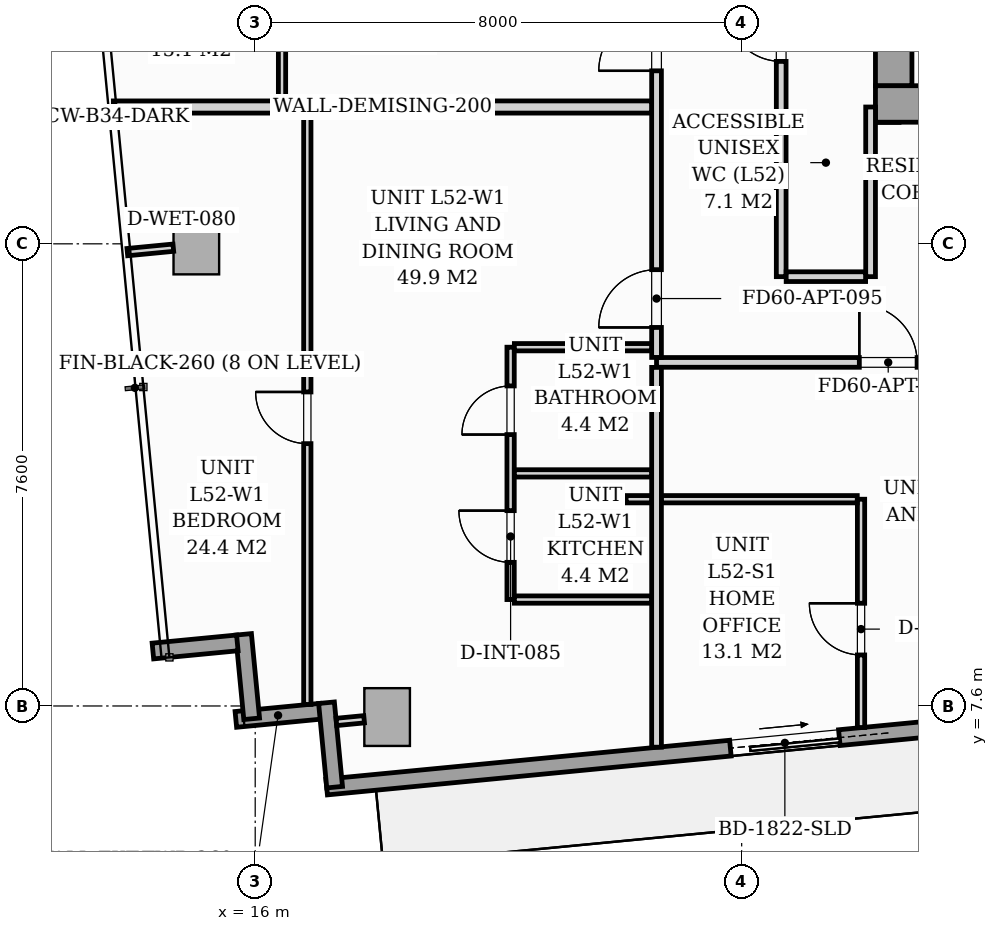
"""IFC4 building model, lengths in metres.
Left out: names, types, materials, properties, quantities, classifications, styles, units other than length and angle.
Written with IfcOpenShell. Run it as: python <this file> out.ifc"""

import sys

from ifc_helpers import new_model, si_unit, direction, frame, frame_2d, origin, origin_2d, place, context, subcontext, project, spatial, rectangle, i_section, extrude, source, transform, mapped, element, fill, save


model = new_model("IFC4")
c1 = context("Model", 3, precision=1e-05, world=origin(), true_north=direction((0.0, 1.0)))
c2 = subcontext(c1, "Body", "Model", "MODEL_VIEW")
j1 = project(units=[si_unit("LENGTHUNIT", "METRE"), si_unit("PLANEANGLEUNIT", "RADIAN")], contexts=[c1])
p1 = place(None, origin())
s1 = spatial("IfcSite", under=j1, at=p1, CompositionType="ELEMENT")
p2 = place(p1, origin())
s2 = spatial("IfcBuilding", under=s1, at=p2, CompositionType="ELEMENT")
p3 = place(p2, frame((0.0, 0.0, 182.6)))
s3 = spatial("IfcBuildingStorey", under=s2, at=p3, CompositionType="ELEMENT", Elevation=182.6)
m1 = source(origin(), c2, "Body", "SweptSolid", [
    extrude(i_section(OverallWidth=0.416, OverallDepth=0.446, WebThickness=0.039, FlangeThickness=0.063, FilletRadius=0.018, at=origin_2d()), origin(), (0.0, 0.0, 1.0), 3.196),
])
p4 = place(p3, frame((26.4, 17.4, 0.002), z_axis=(0.0, 0.0, 1.0), x_axis=(1.0, 0.0, 0.0)))
e1 = element("IfcColumn", 1, at=p4, inside=s3, PredefinedType="PILASTER", context=c2, shape_type="MappedRepresentation", body=[
    mapped(m1, transform((0.0, 0.0, 0.0), scale=1.0)),
])
m2 = source(origin(), c2, "Body", "SweptSolid", [
    extrude(rectangle(XDim=0.75, YDim=0.95, at=origin_2d()), origin(), (0.0, 0.0, 1.0), 3.196),
])
for number, where, z_axis, x_axis in (
    (2, (18.169, 7.418, 0.002), (0.0, 0.0, 1.0), (0.995, 0.096, 0.0)),
    (3, (15.032, 15.173, 0.002), (0.0, 0.0, 1.0), (0.995, 0.096, 0.0)),
):
    element("IfcColumn", number, at=place(p3, frame(where, z_axis=z_axis, x_axis=x_axis)), inside=s3, PredefinedType="COLUMN", context=c2, shape_type="MappedRepresentation", body=[
        mapped(m2, transform((0.0, 0.0, 0.0), scale=1.0)),
    ])
p5 = place(p3, frame((17.07, 7.513, 0.0), z_axis=(0.0, 0.0, 1.0), x_axis=(-0.995391056452, -0.09589913835, 0.0)))
e4 = element("IfcWall", 4, at=p5, inside=s3, PredefinedType="STANDARD", context=c2, shape_type="SweptSolid", body=[
    extrude(rectangle(XDim=1.395, YDim=0.26, at=frame_2d((0.698, 0.0))), origin(), (0.0, 0.0, 1.0), 2.94),
])
p6 = place(p3, frame((15.942, 7.389, 0.0), z_axis=(0.0, 0.0, 1.0), x_axis=(-0.095742423056, 0.99540614245, 0.0)))
e5 = element("IfcWall", 5, at=p6, inside=s3, PredefinedType="STANDARD", context=c2, shape_type="SweptSolid", body=[
    extrude(rectangle(XDim=1.395, YDim=0.26, at=frame_2d((0.697, 0.0))), origin(), (0.0, 0.0, 1.0), 2.94),
])
p7 = place(p3, frame((15.706, 8.637, 0.0), z_axis=(0.0, 0.0, 1.0), x_axis=(-0.995391056452, -0.09589913835, 0.0)))
e6 = element("IfcWall", 6, at=p7, inside=s3, PredefinedType="STANDARD", context=c2, shape_type="SweptSolid", body=[
    extrude(rectangle(XDim=1.395, YDim=0.26, at=frame_2d((0.698, 0.0))), origin(), (0.0, 0.0, 1.0), 2.94),
])
p8 = place(p3, frame((33.201, 7.81, 0.0), z_axis=(0.0, 0.0, 1.0), x_axis=(-0.995397074604, -0.095836652014, 0.0)))
e7 = element("IfcWall", 7, at=p8, inside=s3, PredefinedType="STANDARD", context=c2, shape_type="SweptSolid", body=[
    extrude(rectangle(XDim=16.1, YDim=0.26, at=frame_2d((8.05, 0.0))), origin(), (0.0, 0.0, 1.0), 2.94),
])
p9 = place(p8, frame((7.63, 0.0, 0.0)))
e8 = element("IfcOpeningElement", 8, at=p9, cuts=e7, PredefinedType="OPENING", context=c2, shape_type="SweptSolid", body=[
    extrude(rectangle(XDim=1.8, YDim=2.06, at=frame_2d((0.9, 1.03))), frame((0.0, 0.14, 0.0), z_axis=(0.0, -1.0, 0.0), x_axis=(1.0, 0.0, 0.0)), (0.0, 0.0, 1.0), 0.28),
])
p10 = place(p8, frame((0.7, 0.0, 0.65)))
e9 = element("IfcOpeningElement", 9, at=p10, cuts=e7, PredefinedType="OPENING", context=c2, shape_type="SweptSolid", body=[
    extrude(rectangle(XDim=1.6, YDim=1.5, at=frame_2d((0.8, 0.75))), frame((0.0, 0.14, 0.0), z_axis=(0.0, -1.0, 0.0), x_axis=(1.0, 0.0, 0.0)), (0.0, 0.0, 1.0), 0.28),
])
p11 = place(p3, frame((17.306, 6.265, 0.0), z_axis=(0.0, 0.0, 1.0), x_axis=(-0.095915846097, 0.995389446633, 0.0)))
e10 = element("IfcWall", 10, at=p11, inside=s3, PredefinedType="STANDARD", context=c2, shape_type="SweptSolid", body=[
    extrude(rectangle(XDim=1.395, YDim=0.26, at=frame_2d((0.697, 0.0))), origin(), (0.0, 0.0, 1.0), 2.94),
])
p12 = place(p3, frame((26.2, 17.5, 0.0), z_axis=(0.0, 0.0, 1.0), x_axis=(1.0, 0.0, 0.0)))
e11 = element("IfcWall", 11, at=p12, inside=s3, PredefinedType="SHEAR", context=c2, shape_type="SweptSolid", body=[
    extrude(rectangle(XDim=19.6, YDim=0.6, at=frame_2d((9.8, 0.0))), origin(), (0.0, 0.0, 1.0), 3.2),
])
p13 = place(p12, frame((0.95, 0.0, 0.0)))
e12 = element("IfcOpeningElement", 12, at=p13, cuts=e11, PredefinedType="OPENING", context=c2, shape_type="SweptSolid", body=[
    extrude(rectangle(XDim=0.95, YDim=2.06, at=frame_2d((0.475, 1.03))), frame((0.0, 0.31, 0.0), z_axis=(0.0, -1.0, 0.0), x_axis=(1.0, 0.0, 0.0)), (0.0, 0.0, 1.0), 0.62),
])
p14 = place(p12, frame((9.38, 0.0, 0.0)))
e13 = element("IfcOpeningElement", 13, at=p14, cuts=e11, PredefinedType="OPENING", context=c2, shape_type="SweptSolid", body=[
    extrude(rectangle(XDim=0.85, YDim=2.0, at=frame_2d((0.425, 1.0))), frame((0.0, 0.31, 0.0), z_axis=(0.0, -1.0, 0.0), x_axis=(1.0, 0.0, 0.0)), (0.0, 0.0, 1.0), 0.62),
])
p15 = place(p12, frame((17.55, 0.0, 0.0)))
e14 = element("IfcOpeningElement", 14, at=p15, cuts=e11, PredefinedType="OPENING", context=c2, shape_type="SweptSolid", body=[
    extrude(rectangle(XDim=0.95, YDim=2.06, at=frame_2d((0.475, 1.03))), frame((0.0, 0.31, 0.0), z_axis=(0.0, -1.0, 0.0), x_axis=(1.0, 0.0, 0.0)), (0.0, 0.0, 1.0), 0.62),
])
p16 = place(p3, frame((26.5, 17.802, 0.0), z_axis=(0.0, 0.0, 1.0), x_axis=(0.0, 1.0, 0.0)))
e15 = element("IfcWall", 15, at=p16, inside=s3, PredefinedType="SHEAR", context=c2, shape_type="SweptSolid", body=[
    extrude(rectangle(XDim=5.796, YDim=0.6, at=frame_2d((2.898, 0.0))), origin(), (0.0, 0.0, 1.0), 3.2),
])
p17 = place(p3, frame((22.6, 13.25, 0.0), z_axis=(0.0, 0.0, 1.0), x_axis=(1.0, 0.0, 0.0)))
e16 = element("IfcWall", 16, at=p17, inside=s3, PredefinedType="PARTITIONING", context=c2, shape_type="SweptSolid", body=[
    extrude(rectangle(XDim=23.28, YDim=0.16, at=frame_2d((11.64, 0.0))), origin(), (0.0, 0.0, 1.0), 2.94),
])
p18 = place(p17, frame((3.335, 0.0, 0.0)))
e17 = element("IfcOpeningElement", 17, at=p18, cuts=e16, PredefinedType="OPENING", context=c2, shape_type="SweptSolid", body=[
    extrude(rectangle(XDim=0.95, YDim=2.06, at=frame_2d((0.475, 1.03))), frame((0.0, 0.09, 0.0), z_axis=(0.0, -1.0, 0.0), x_axis=(1.0, 0.0, 0.0)), (0.0, 0.0, 1.0), 0.18),
])
p19 = place(p17, frame((15.096, 0.0, 0.0)))
e18 = element("IfcOpeningElement", 18, at=p19, cuts=e16, PredefinedType="OPENING", context=c2, shape_type="SweptSolid", body=[
    extrude(rectangle(XDim=0.95, YDim=2.06, at=frame_2d((0.475, 1.03))), frame((0.0, 0.09, 0.0), z_axis=(0.0, -1.0, 0.0), x_axis=(1.0, 0.0, 0.0)), (0.0, 0.0, 1.0), 0.18),
])
p20 = place(p3, frame((22.6, 6.922, 0.0), z_axis=(0.0, 0.0, 1.0), x_axis=(0.0, 1.0, 0.0)))
e19 = element("IfcWall", 19, at=p20, inside=s3, PredefinedType="PARTITIONING", context=c2, shape_type="SweptSolid", body=[
    extrude(rectangle(XDim=6.246, YDim=0.16, at=frame_2d((3.123, 0.0))), origin(), (0.0, 0.0, 1.0), 2.94),
])
p21 = place(p3, frame((22.6, 13.332, 0.0), z_axis=(0.0, 0.0, 1.0), x_axis=(0.0, 1.0, 0.0)))
e20 = element("IfcWall", 20, at=p21, inside=s3, PredefinedType="PARTITIONING", context=c2, shape_type="SweptSolid", body=[
    extrude(rectangle(XDim=11.549, YDim=0.16, at=frame_2d((5.774, 0.0))), origin(), (0.0, 0.0, 1.0), 2.94),
])
p22 = place(p21, frame((0.493, 0.0, 0.0)))
e21 = element("IfcOpeningElement", 21, at=p22, cuts=e20, PredefinedType="OPENING", context=c2, shape_type="SweptSolid", body=[
    extrude(rectangle(XDim=0.95, YDim=2.06, at=frame_2d((0.475, 1.03))), frame((0.0, 0.09, 0.0), z_axis=(0.0, -1.0, 0.0), x_axis=(1.0, 0.0, 0.0)), (0.0, 0.0, 1.0), 0.18),
])
p23 = place(p21, frame((4.713, 0.0, 0.0)))
e22 = element("IfcOpeningElement", 22, at=p23, cuts=e20, PredefinedType="OPENING", context=c2, shape_type="SweptSolid", body=[
    extrude(rectangle(XDim=0.95, YDim=2.06, at=frame_2d((0.475, 1.03))), frame((0.0, 0.09, 0.0), z_axis=(0.0, -1.0, 0.0), x_axis=(1.0, 0.0, 0.0)), (0.0, 0.0, 1.0), 0.18),
])
p24 = place(p3, frame((25.963, 7.246, 0.0), z_axis=(0.0, 0.0, 1.0), x_axis=(0.0, 1.0, 0.0)))
e23 = element("IfcWall", 23, at=p24, inside=s3, PredefinedType="PARTITIONING", context=c2, shape_type="SweptSolid", body=[
    extrude(rectangle(XDim=3.754, YDim=0.12, at=frame_2d((1.877, 0.0))), origin(), (0.0, 0.0, 1.0), 2.94),
])
p25 = place(p24, frame((1.193, 0.0, 0.0)))
e24 = element("IfcOpeningElement", 24, at=p25, cuts=e23, PredefinedType="OPENING", context=c2, shape_type="SweptSolid", body=[
    extrude(rectangle(XDim=0.85, YDim=2.05, at=frame_2d((0.425, 1.025))), frame((0.0, 0.07, 0.0), z_axis=(0.0, -1.0, 0.0), x_axis=(1.0, 0.0, 0.0)), (0.0, 0.0, 1.0), 0.14),
])
p26 = place(p3, frame((22.1, 11.0, 0.0), z_axis=(0.0, 0.0, 1.0), x_axis=(1.0, 0.0, 0.0)))
e25 = element("IfcWall", 25, at=p26, inside=s3, PredefinedType="PARTITIONING", context=c2, shape_type="SweptSolid", body=[
    extrude(rectangle(XDim=0.418, YDim=0.12, at=frame_2d((0.209, 0.0))), origin(), (0.0, 0.0, 1.0), 2.94),
])
p27 = place(p3, frame((22.682, 11.0, 0.0), z_axis=(0.0, 0.0, 1.0), x_axis=(1.0, 0.0, 0.0)))
e26 = element("IfcWall", 26, at=p27, inside=s3, PredefinedType="PARTITIONING", context=c2, shape_type="SweptSolid", body=[
    extrude(rectangle(XDim=3.219, YDim=0.12, at=frame_2d((1.609, 0.0))), origin(), (0.0, 0.0, 1.0), 2.94),
])
p28 = place(p3, frame((13.667, 17.45, 0.0), z_axis=(0.0, 0.0, 1.0), x_axis=(1.0, 0.0, 0.0)))
e27 = element("IfcWall", 27, at=p28, inside=s3, PredefinedType="PARTITIONING", context=c2, shape_type="SweptSolid", body=[
    extrude(rectangle(XDim=8.851, YDim=0.2, at=frame_2d((4.425, 0.0))), origin(), (0.0, 0.0, 1.0), 2.94),
])
p29 = place(p3, frame((20.2, 9.35, 0.0), z_axis=(0.0, 0.0, 1.0), x_axis=(0.0, 1.0, 0.0)))
e28 = element("IfcWall", 28, at=p29, inside=s3, PredefinedType="PARTITIONING", context=c2, shape_type="SweptSolid", body=[
    extrude(rectangle(XDim=4.15, YDim=0.12, at=frame_2d((2.075, 0.0))), origin(), (0.0, 0.0, 1.0), 2.94),
])
p30 = place(p29, frame((0.612, 0.0, 0.0)))
e29 = element("IfcOpeningElement", 29, at=p30, cuts=e28, PredefinedType="OPENING", context=c2, shape_type="SweptSolid", body=[
    extrude(rectangle(XDim=0.85, YDim=2.05, at=frame_2d((0.425, 1.025))), frame((0.0, 0.07, 0.0), z_axis=(0.0, -1.0, 0.0), x_axis=(1.0, 0.0, 0.0)), (0.0, 0.0, 1.0), 0.14),
])
p31 = place(p29, frame((2.713, 0.0, 0.0)))
e30 = element("IfcOpeningElement", 30, at=p31, cuts=e28, PredefinedType="OPENING", context=c2, shape_type="SweptSolid", body=[
    extrude(rectangle(XDim=0.8, YDim=2.02, at=frame_2d((0.4, 1.01))), frame((0.0, 0.07, 0.0), z_axis=(0.0, -1.0, 0.0), x_axis=(1.0, 0.0, 0.0)), (0.0, 0.0, 1.0), 0.14),
])
for number, where, z_axis, x_axis in (
    (31, (20.262, 11.425, 0.0), (0.0, 0.0, 1.0), (1.0, 0.0, 0.0)),
    (32, (20.262, 9.35, 0.0), (0.0, 0.0, 1.0), (1.0, 0.0, 0.0)),
    (33, (20.262, 13.5, 0.0), (0.0, 0.0, 1.0), (1.0, 0.0, 0.0)),
):
    element("IfcWall", number, at=place(p3, frame(where, z_axis=z_axis, x_axis=x_axis)), inside=s3, PredefinedType="PARTITIONING", context=c2, shape_type="SweptSolid", body=[
        extrude(rectangle(XDim=2.256, YDim=0.12, at=frame_2d((1.128, 0.0))), origin(), (0.0, 0.0, 1.0), 2.94),
    ])
p32 = place(p3, frame((16.857, 7.625, 0.0), z_axis=(0.0, 0.0, 1.0), x_axis=(0.0, 1.0, 0.0)))
e34 = element("IfcWall", 34, at=p32, inside=s3, PredefinedType="PARTITIONING", context=c2, shape_type="SweptSolid", body=[
    extrude(rectangle(XDim=9.723, YDim=0.12, at=frame_2d((4.861, 0.0))), origin(), (0.0, 0.0, 1.0), 2.94),
])
p33 = place(p32, frame((4.289, 0.0, 0.0)))
e35 = element("IfcOpeningElement", 35, at=p33, cuts=e34, PredefinedType="OPENING", context=c2, shape_type="SweptSolid", body=[
    extrude(rectangle(XDim=0.85, YDim=2.05, at=frame_2d((0.425, 1.025))), frame((0.0, 0.07, 0.0), z_axis=(0.0, -1.0, 0.0), x_axis=(1.0, 0.0, 0.0)), (0.0, 0.0, 1.0), 0.14),
])
p34 = place(p3, frame((16.441, 17.552, 0.0), z_axis=(0.0, 0.0, 1.0), x_axis=(0.0, 1.0, 0.0)))
e36 = element("IfcWall", 36, at=p34, inside=s3, PredefinedType="PARTITIONING", context=c2, shape_type="SweptSolid", body=[
    extrude(rectangle(XDim=6.736, YDim=0.12, at=frame_2d((3.368, 0.0))), origin(), (0.0, 0.0, 1.0), 2.382),
])
p35 = place(p34, frame((2.43, 0.0, 0.0)))
e37 = element("IfcOpeningElement", 37, at=p35, cuts=e36, PredefinedType="OPENING", context=c2, shape_type="SweptSolid", body=[
    extrude(rectangle(XDim=0.85, YDim=2.05, at=frame_2d((0.425, 1.025))), frame((0.0, 0.07, 0.0), z_axis=(0.0, -1.0, 0.0), x_axis=(1.0, 0.0, 0.0)), (0.0, 0.0, 1.0), 0.14),
])
p36 = place(p3, frame((24.65, 14.66, 0.0), z_axis=(0.0, 0.0, 1.0), x_axis=(0.0, 1.0, 0.0)))
e38 = element("IfcWall", 38, at=p36, inside=s3, PredefinedType="PARTITIONING", context=c2, shape_type="SweptSolid", body=[
    extrude(rectangle(XDim=5.59, YDim=0.16, at=frame_2d((2.795, 0.0))), origin(), (0.0, 0.0, 1.0), 2.94),
])
p37 = place(p36, frame((3.54, 0.0, 0.0)))
e39 = element("IfcOpeningElement", 39, at=p37, cuts=e38, PredefinedType="OPENING", context=c2, shape_type="SweptSolid", body=[
    extrude(rectangle(XDim=0.9, YDim=2.05, at=frame_2d((0.45, 1.025))), frame((0.0, 0.09, 0.0), z_axis=(0.0, -1.0, 0.0), x_axis=(1.0, 0.0, 0.0)), (0.0, 0.0, 1.0), 0.18),
])
p38 = place(p3, frame((26.12, 14.66, 0.0), z_axis=(0.0, 0.0, 1.0), x_axis=(0.0, 1.0, 0.0)))
e40 = element("IfcWall", 40, at=p38, inside=s3, PredefinedType="PARTITIONING", context=c2, shape_type="SweptSolid", body=[
    extrude(rectangle(XDim=2.79, YDim=0.16, at=frame_2d((1.395, 0.0))), origin(), (0.0, 0.0, 1.0), 2.94),
])
p39 = place(p3, frame((24.732, 14.66, 0.0), z_axis=(0.0, 0.0, 1.0), x_axis=(1.0, 0.0, 0.0)))
e41 = element("IfcWall", 41, at=p39, inside=s3, PredefinedType="PARTITIONING", context=c2, shape_type="SweptSolid", body=[
    extrude(rectangle(XDim=1.306, YDim=0.16, at=frame_2d((0.653, 0.0))), origin(), (0.0, 0.0, 1.0), 2.94),
])
p40 = place(p3, frame((17.791, 7.382, 0.0), z_axis=(0.0, 0.0, 1.0), x_axis=(-0.995384576284, -0.09596637586, 0.0)))
e42 = element("IfcWall", 42, at=p40, inside=s3, PredefinedType="PARTITIONING", context=c2, shape_type="SweptSolid", body=[
    extrude(rectangle(XDim=0.458, YDim=0.12, at=frame_2d((0.229, 0.0))), origin(), (0.0, 0.0, 1.0), 2.94),
])
p41 = place(p3, frame((14.654, 15.136, 0.0), z_axis=(0.0, 0.0, 1.0), x_axis=(-0.995408440582, -0.095718527039, 0.0)))
e43 = element("IfcWall", 43, at=p41, inside=s3, PredefinedType="PARTITIONING", context=c2, shape_type="SweptSolid", body=[
    extrude(rectangle(XDim=0.76, YDim=0.12, at=frame_2d((0.38, 0.0))), origin(), (0.0, 0.0, 1.0), 2.94),
])
m3 = source(origin(), c2, "Body", "SweptSolid", [
    extrude(rectangle(XDim=1.8, YDim=2.06, at=frame_2d((0.9, 1.03))), frame((0.0, 0.025, 0.0), z_axis=(0.0, -1.0, 0.0), x_axis=(1.0, 0.0, 0.0)), (0.0, 0.0, 1.0), 0.05),
])
p42 = place(p9, origin())
e44 = element("IfcDoor", 44, at=p42, inside=s3, OperationType="SLIDING_TO_LEFT", PredefinedType="DOOR", context=c2, shape_type="MappedRepresentation", body=[
    mapped(m3, transform((0.0, 0.0, 0.0), scale=1.0)),
])
fill(e8, e44)
m4 = source(origin(), c2, "Body", "SweptSolid", [
    extrude(rectangle(XDim=0.85, YDim=2.05, at=frame_2d((0.425, 1.025))), frame((0.0, 0.025, 0.0), z_axis=(0.0, -1.0, 0.0), x_axis=(1.0, 0.0, 0.0)), (0.0, 0.0, 1.0), 0.05),
])
p43 = place(p25, origin())
e45 = element("IfcDoor", 45, at=p43, inside=s3, OperationType="SINGLE_SWING_RIGHT", PredefinedType="DOOR", context=c2, shape_type="MappedRepresentation", body=[
    mapped(m4, transform((0.0, 0.0, 0.0), scale=1.0)),
])
fill(e24, e45)
m5 = source(origin(), c2, "Body", "SweptSolid", [
    extrude(rectangle(XDim=0.95, YDim=2.06, at=frame_2d((0.475, 1.03))), frame((0.0, 0.025, 0.0), z_axis=(0.0, -1.0, 0.0), x_axis=(1.0, 0.0, 0.0)), (0.0, 0.0, 1.0), 0.05),
])
p44 = place(p18, origin())
e46 = element("IfcDoor", 46, at=p44, inside=s3, OperationType="SINGLE_SWING_LEFT", PredefinedType="DOOR", context=c2, shape_type="MappedRepresentation", body=[
    mapped(m5, transform((0.0, 0.0, 0.0), scale=1.0)),
])
fill(e17, e46)
p45 = place(p22, origin())
e47 = element("IfcDoor", 47, at=p45, inside=s3, OperationType="SINGLE_SWING_LEFT", PredefinedType="DOOR", context=c2, shape_type="MappedRepresentation", body=[
    mapped(m5, transform((0.0, 0.0, 0.0), scale=1.0)),
])
fill(e21, e47)
p46 = place(p30, origin())
e48 = element("IfcDoor", 48, at=p46, inside=s3, OperationType="SINGLE_SWING_RIGHT", PredefinedType="DOOR", context=c2, shape_type="MappedRepresentation", body=[
    mapped(m4, transform((0.0, 0.0, 0.0), scale=1.0)),
])
fill(e29, e48)
m6 = source(origin(), c2, "Body", "SweptSolid", [
    extrude(rectangle(XDim=0.8, YDim=2.02, at=frame_2d((0.4, 1.01))), frame((0.0, 0.025, 0.0), z_axis=(0.0, -1.0, 0.0), x_axis=(1.0, 0.0, 0.0)), (0.0, 0.0, 1.0), 0.05),
])
p47 = place(p31, origin())
e49 = element("IfcDoor", 49, at=p47, inside=s3, OperationType="SINGLE_SWING_LEFT", PredefinedType="DOOR", context=c2, shape_type="MappedRepresentation", body=[
    mapped(m6, transform((0.0, 0.0, 0.0), scale=1.0)),
])
fill(e30, e49)
p48 = place(p33, origin())
e50 = element("IfcDoor", 50, at=p48, inside=s3, OperationType="SINGLE_SWING_RIGHT", PredefinedType="DOOR", context=c2, shape_type="MappedRepresentation", body=[
    mapped(m4, transform((0.0, 0.0, 0.0), scale=1.0)),
])
fill(e35, e50)
p49 = place(p23, origin())
e51 = element("IfcDoor", 51, at=p49, inside=s3, OperationType="SINGLE_SWING_LEFT", PredefinedType="DOOR", context=c2, shape_type="MappedRepresentation", body=[
    mapped(m5, transform((0.0, 0.0, 0.0), scale=1.0)),
])
fill(e22, e51)
m7 = source(origin(), c2, "Body", "SweptSolid", [
    extrude(rectangle(XDim=0.9, YDim=2.05, at=frame_2d((0.45, 1.025))), frame((0.0, 0.025, 0.0), z_axis=(0.0, -1.0, 0.0), x_axis=(1.0, 0.0, 0.0)), (0.0, 0.0, 1.0), 0.05),
])
p50 = place(p37, origin())
e52 = element("IfcDoor", 52, at=p50, inside=s3, OperationType="SINGLE_SWING_RIGHT", PredefinedType="DOOR", context=c2, shape_type="MappedRepresentation", body=[
    mapped(m7, transform((0.0, 0.0, 0.0), scale=1.0)),
])
fill(e39, e52)
save(model, sys.argv[1])
